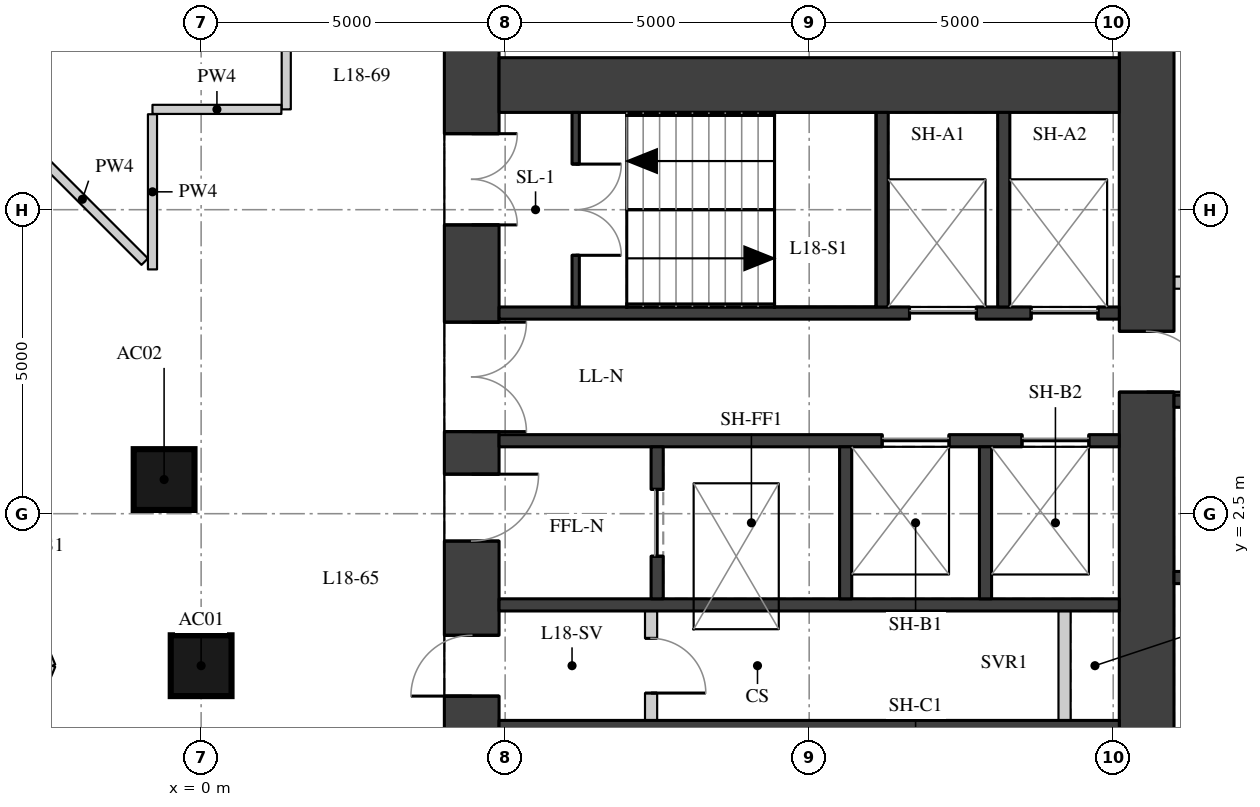
"""IFC4 building model, lengths in metres.
Left out: names, types, materials, properties, quantities, classifications, styles, units other than length and angle.
Written with IfcOpenShell. Run it as: python <this file> out.ifc"""

import sys

from ifc_helpers import new_model, si_unit, direction, frame, frame_2d, origin, origin_2d, place, context, subcontext, project, spatial, rectangle, extrude, element, fill, save


model = new_model("IFC4")
c1 = context("Model", 3, precision=1e-05, world=origin(), true_north=direction((0.0, 1.0)))
c2 = subcontext(c1, "Body", "Model", "MODEL_VIEW")
j1 = project(units=[si_unit("LENGTHUNIT", "METRE"), si_unit("PLANEANGLEUNIT", "RADIAN")], contexts=[c1])
p1 = place(None, origin())
s1 = spatial("IfcSite", under=j1, at=p1, CompositionType="ELEMENT")
p2 = place(p1, origin())
s2 = spatial("IfcBuilding", under=s1, at=p2, CompositionType="ELEMENT")
p3 = place(p2, frame((0.0, 0.0, 67.9)))
s3 = spatial("IfcBuildingStorey", under=s2, at=p3, CompositionType="ELEMENT", Elevation=67.9)
for number, where, z_axis, x_axis in (
    (1, (0.0, 0.0, 0.0), (0.0, 0.0, 1.0), (1.0, 0.0, 0.0)),
    (2, (-0.609, 3.062, 0.0), (0.0, 0.0, 1.0), (1.0, 0.0, 0.0)),
):
    element("IfcColumn", number, at=place(p3, frame(where, z_axis=z_axis, x_axis=x_axis)), inside=s3, PredefinedType="COLUMN", context=c2, shape_type="SweptSolid", body=[
        extrude(rectangle(XDim=1.0, YDim=1.0, at=origin_2d()), origin(), (0.0, 0.0, 1.0), 3.3),
    ])
p4 = place(p3, frame((4.45, -11.1, 0.0), z_axis=(0.0, 0.0, 1.0), x_axis=(0.0, 1.0, 0.0)))
e3 = element("IfcWall", 3, at=p4, inside=s3, PredefinedType="SHEAR", context=c2, shape_type="SweptSolid", body=[
    extrude(rectangle(XDim=22.2, YDim=0.9, at=frame_2d((11.1, 0.0))), origin(), (0.0, 0.0, 1.0), 3.02),
])
p5 = place(p4, frame((2.35, 0.0, 0.0)))
e4 = element("IfcOpeningElement", 4, at=p5, cuts=e3, PredefinedType="OPENING", context=c2, shape_type="SweptSolid", body=[
    extrude(rectangle(XDim=1.5, YDim=2.1, at=frame_2d((0.75, 1.05))), frame((0.0, 0.46, 0.0), z_axis=(0.0, -1.0, 0.0), x_axis=(1.0, 0.0, 0.0)), (0.0, 0.0, 1.0), 0.92),
])
p6 = place(p4, frame((5.45, 0.0, 0.0)))
e5 = element("IfcOpeningElement", 5, at=p6, cuts=e3, PredefinedType="OPENING", context=c2, shape_type="SweptSolid", body=[
    extrude(rectangle(XDim=1.8, YDim=2.1, at=frame_2d((0.9, 1.05))), frame((0.0, 0.46, 0.0), z_axis=(0.0, -1.0, 0.0), x_axis=(1.0, 0.0, 0.0)), (0.0, 0.0, 1.0), 0.92),
])
p7 = place(p4, frame((7.95, 0.0, 0.0)))
e6 = element("IfcOpeningElement", 6, at=p7, cuts=e3, PredefinedType="OPENING", context=c2, shape_type="SweptSolid", body=[
    extrude(rectangle(XDim=1.1, YDim=2.1, at=frame_2d((0.55, 1.05))), frame((0.0, 0.46, 0.0), z_axis=(0.0, -1.0, 0.0), x_axis=(1.0, 0.0, 0.0)), (0.0, 0.0, 1.0), 0.92),
])
p8 = place(p4, frame((10.6, 0.0, 0.0)))
e7 = element("IfcOpeningElement", 7, at=p8, cuts=e3, PredefinedType="OPENING", context=c2, shape_type="SweptSolid", body=[
    extrude(rectangle(XDim=1.0, YDim=2.1, at=frame_2d((0.5, 1.05))), frame((0.0, 0.46, 0.0), z_axis=(0.0, -1.0, 0.0), x_axis=(1.0, 0.0, 0.0)), (0.0, 0.0, 1.0), 0.92),
])
p9 = place(p4, frame((13.15, 0.0, 0.0)))
e8 = element("IfcOpeningElement", 8, at=p9, cuts=e3, PredefinedType="OPENING", context=c2, shape_type="SweptSolid", body=[
    extrude(rectangle(XDim=1.1, YDim=2.1, at=frame_2d((0.55, 1.05))), frame((0.0, 0.46, 0.0), z_axis=(0.0, -1.0, 0.0), x_axis=(1.0, 0.0, 0.0)), (0.0, 0.0, 1.0), 0.92),
])
p10 = place(p4, frame((14.95, 0.0, 0.0)))
e9 = element("IfcOpeningElement", 9, at=p10, cuts=e3, PredefinedType="OPENING", context=c2, shape_type="SweptSolid", body=[
    extrude(rectangle(XDim=1.8, YDim=2.1, at=frame_2d((0.9, 1.05))), frame((0.0, 0.46, 0.0), z_axis=(0.0, -1.0, 0.0), x_axis=(1.0, 0.0, 0.0)), (0.0, 0.0, 1.0), 0.92),
])
p11 = place(p4, frame((18.35, 0.0, 0.0)))
e10 = element("IfcOpeningElement", 10, at=p11, cuts=e3, PredefinedType="OPENING", context=c2, shape_type="SweptSolid", body=[
    extrude(rectangle(XDim=1.5, YDim=2.1, at=frame_2d((0.75, 1.05))), frame((0.0, 0.46, 0.0), z_axis=(0.0, -1.0, 0.0), x_axis=(1.0, 0.0, 0.0)), (0.0, 0.0, 1.0), 0.92),
])
p12 = place(p3, frame((15.55, -11.1, 0.0), z_axis=(0.0, 0.0, 1.0), x_axis=(0.0, 1.0, 0.0)))
e11 = element("IfcWall", 11, at=p12, inside=s3, PredefinedType="SHEAR", context=c2, shape_type="SweptSolid", body=[
    extrude(rectangle(XDim=22.2, YDim=0.9, at=frame_2d((11.1, 0.0))), origin(), (0.0, 0.0, 1.0), 3.02),
])
p13 = place(p12, frame((15.6, 0.0, 0.0)))
e12 = element("IfcOpeningElement", 12, at=p13, cuts=e11, PredefinedType="OPENING", context=c2, shape_type="SweptSolid", body=[
    extrude(rectangle(XDim=1.0, YDim=2.1, at=frame_2d((0.5, 1.05))), frame((0.0, 0.46, 0.0), z_axis=(0.0, -1.0, 0.0), x_axis=(1.0, 0.0, 0.0)), (0.0, 0.0, 1.0), 0.92),
])
p14 = place(p12, frame((5.6, 0.0, 0.0)))
e13 = element("IfcOpeningElement", 13, at=p14, cuts=e11, PredefinedType="OPENING", context=c2, shape_type="SweptSolid", body=[
    extrude(rectangle(XDim=1.0, YDim=2.1, at=frame_2d((0.5, 1.05))), frame((0.0, 0.46, 0.0), z_axis=(0.0, -1.0, 0.0), x_axis=(1.0, 0.0, 0.0)), (0.0, 0.0, 1.0), 0.92),
])
p15 = place(p3, frame((4.9, 9.55, 0.0), z_axis=(0.0, 0.0, 1.0), x_axis=(1.0, 0.0, 0.0)))
e14 = element("IfcWall", 14, at=p15, inside=s3, PredefinedType="SHEAR", context=c2, shape_type="SweptSolid", body=[
    extrude(rectangle(XDim=10.2, YDim=0.9, at=frame_2d((5.1, 0.0))), origin(), (0.0, 0.0, 1.0), 3.02),
])
p16 = place(p3, frame((4.9, 5.8, 0.0), z_axis=(0.0, 0.0, 1.0), x_axis=(1.0, 0.0, 0.0)))
e15 = element("IfcWall", 15, at=p16, inside=s3, PredefinedType="SHEAR", context=c2, shape_type="SweptSolid", body=[
    extrude(rectangle(XDim=10.2, YDim=0.2, at=frame_2d((5.1, 0.0))), origin(), (0.0, 0.0, 1.0), 3.02),
])
p17 = place(p16, frame((6.75, 0.0, 0.0)))
e16 = element("IfcOpeningElement", 16, at=p17, cuts=e15, PredefinedType="OPENING", context=c2, shape_type="SweptSolid", body=[
    extrude(rectangle(XDim=1.1, YDim=2.1, at=frame_2d((0.55, 1.05))), frame((0.0, 0.11, 0.0), z_axis=(0.0, -1.0, 0.0), x_axis=(1.0, 0.0, 0.0)), (0.0, 0.0, 1.0), 0.22),
])
p18 = place(p16, frame((8.75, 0.0, 0.0)))
e17 = element("IfcOpeningElement", 17, at=p18, cuts=e15, PredefinedType="OPENING", context=c2, shape_type="SweptSolid", body=[
    extrude(rectangle(XDim=1.1, YDim=2.1, at=frame_2d((0.55, 1.05))), frame((0.0, 0.11, 0.0), z_axis=(0.0, -1.0, 0.0), x_axis=(1.0, 0.0, 0.0)), (0.0, 0.0, 1.0), 0.22),
])
p19 = place(p3, frame((4.9, 3.7, 0.0), z_axis=(0.0, 0.0, 1.0), x_axis=(1.0, 0.0, 0.0)))
e18 = element("IfcWall", 18, at=p19, inside=s3, PredefinedType="SHEAR", context=c2, shape_type="SweptSolid", body=[
    extrude(rectangle(XDim=10.2, YDim=0.2, at=frame_2d((5.1, 0.0))), origin(), (0.0, 0.0, 1.0), 3.02),
])
p20 = place(p19, frame((6.3, 0.0, 0.0)))
e19 = element("IfcOpeningElement", 19, at=p20, cuts=e18, PredefinedType="OPENING", context=c2, shape_type="SweptSolid", body=[
    extrude(rectangle(XDim=1.1, YDim=2.1, at=frame_2d((0.55, 1.05))), frame((0.0, 0.11, 0.0), z_axis=(0.0, -1.0, 0.0), x_axis=(1.0, 0.0, 0.0)), (0.0, 0.0, 1.0), 0.22),
])
p21 = place(p19, frame((8.6, 0.0, 0.0)))
e20 = element("IfcOpeningElement", 20, at=p21, cuts=e18, PredefinedType="OPENING", context=c2, shape_type="SweptSolid", body=[
    extrude(rectangle(XDim=1.1, YDim=2.1, at=frame_2d((0.55, 1.05))), frame((0.0, 0.11, 0.0), z_axis=(0.0, -1.0, 0.0), x_axis=(1.0, 0.0, 0.0)), (0.0, 0.0, 1.0), 0.22),
])
for number, where, z_axis, x_axis in (
    (21, (4.9, 1.0, 0.0), (0.0, 0.0, 1.0), (1.0, 0.0, 0.0)),
    (22, (4.9, -1.0, 0.0), (0.0, 0.0, 1.0), (1.0, 0.0, 0.0)),
):
    element("IfcWall", number, at=place(p3, frame(where, z_axis=z_axis, x_axis=x_axis)), inside=s3, PredefinedType="SHEAR", context=c2, shape_type="SweptSolid", body=[
        extrude(rectangle(XDim=10.2, YDim=0.2, at=frame_2d((5.1, 0.0))), origin(), (0.0, 0.0, 1.0), 3.02),
    ])
for number, where, z_axis, x_axis in (
    (23, (11.2, 5.9, 0.0), (0.0, 0.0, 1.0), (0.0, 1.0, 0.0)),
    (24, (13.2, 5.9, 0.0), (0.0, 0.0, 1.0), (0.0, 1.0, 0.0)),
):
    element("IfcWall", number, at=place(p3, frame(where, z_axis=z_axis, x_axis=x_axis)), inside=s3, PredefinedType="SHEAR", context=c2, shape_type="SweptSolid", body=[
        extrude(rectangle(XDim=3.2, YDim=0.2, at=frame_2d((1.6, 0.0))), origin(), (0.0, 0.0, 1.0), 3.02),
    ])
p22 = place(p3, frame((7.5, 1.1, 0.0), z_axis=(0.0, 0.0, 1.0), x_axis=(0.0, 1.0, 0.0)))
e25 = element("IfcWall", 25, at=p22, inside=s3, PredefinedType="SHEAR", context=c2, shape_type="SweptSolid", body=[
    extrude(rectangle(XDim=2.5, YDim=0.2, at=frame_2d((1.25, 0.0))), origin(), (0.0, 0.0, 1.0), 3.02),
])
p23 = place(p22, frame((0.7, 0.0, 0.0)))
e26 = element("IfcOpeningElement", 26, at=p23, cuts=e25, PredefinedType="OPENING", context=c2, shape_type="SweptSolid", body=[
    extrude(rectangle(XDim=1.1, YDim=2.1, at=frame_2d((0.55, 1.05))), frame((0.0, 0.11, 0.0), z_axis=(0.0, -1.0, 0.0), x_axis=(1.0, 0.0, 0.0)), (0.0, 0.0, 1.0), 0.22),
])
for number, where, z_axis, x_axis in (
    (27, (10.6, 1.1, 0.0), (0.0, 0.0, 1.0), (0.0, 1.0, 0.0)),
    (28, (12.9, 1.1, 0.0), (0.0, 0.0, 1.0), (0.0, 1.0, 0.0)),
):
    element("IfcWall", number, at=place(p3, frame(where, z_axis=z_axis, x_axis=x_axis)), inside=s3, PredefinedType="SHEAR", context=c2, shape_type="SweptSolid", body=[
        extrude(rectangle(XDim=2.5, YDim=0.2, at=frame_2d((1.25, 0.0))), origin(), (0.0, 0.0, 1.0), 3.02),
    ])
p24 = place(p3, frame((6.16, 5.9, 0.0), z_axis=(0.0, 0.0, 1.0), x_axis=(0.0, 1.0, 0.0)))
e29 = element("IfcWall", 29, at=p24, inside=s3, PredefinedType="SHEAR", context=c2, shape_type="SweptSolid", body=[
    extrude(rectangle(XDim=3.2, YDim=0.12, at=frame_2d((1.6, 0.0))), origin(), (0.0, 0.0, 1.0), 3.02),
])
p25 = place(p24, frame((0.85, 0.0, 0.0)))
e30 = element("IfcOpeningElement", 30, at=p25, cuts=e29, PredefinedType="OPENING", context=c2, shape_type="SweptSolid", body=[
    extrude(rectangle(XDim=1.5, YDim=2.1, at=frame_2d((0.75, 1.05))), frame((0.0, 0.07, 0.0), z_axis=(0.0, -1.0, 0.0), x_axis=(1.0, 0.0, 0.0)), (0.0, 0.0, 1.0), 0.14),
])
p26 = place(p3, frame((7.4, -0.9, 0.0), z_axis=(0.0, 0.0, 1.0), x_axis=(0.0, 1.0, 0.0)))
e31 = element("IfcWall", 31, at=p26, inside=s3, PredefinedType="PARTITIONING", context=c2, shape_type="SweptSolid", body=[
    extrude(rectangle(XDim=1.8, YDim=0.2, at=frame_2d((0.9, 0.0))), origin(), (0.0, 0.0, 1.0), 3.02),
])
p27 = place(p26, frame((0.45, 0.0, 0.0)))
e32 = element("IfcOpeningElement", 32, at=p27, cuts=e31, PredefinedType="OPENING", context=c2, shape_type="SweptSolid", body=[
    extrude(rectangle(XDim=0.9, YDim=2.1, at=frame_2d((0.45, 1.05))), frame((0.0, 0.11, 0.0), z_axis=(0.0, -1.0, 0.0), x_axis=(1.0, 0.0, 0.0)), (0.0, 0.0, 1.0), 0.22),
])
p28 = place(p3, frame((14.2, -0.9, 0.0), z_axis=(0.0, 0.0, 1.0), x_axis=(0.0, 1.0, 0.0)))
e33 = element("IfcWall", 33, at=p28, inside=s3, PredefinedType="PARTITIONING", context=c2, shape_type="SweptSolid", body=[
    extrude(rectangle(XDim=1.8, YDim=0.2, at=frame_2d((0.9, 0.0))), origin(), (0.0, 0.0, 1.0), 3.02),
])
for number, where, z_axis, x_axis in (
    (34, (16.0, 1.45, 0.0), (0.0, 0.0, 1.0), (1.0, 0.0, 0.0)),
    (35, (16.0, 4.35, 0.0), (0.0, 0.0, 1.0), (1.0, 0.0, 0.0)),
):
    element("IfcWall", number, at=place(p3, frame(where, z_axis=z_axis, x_axis=x_axis)), inside=s3, PredefinedType="SHEAR", context=c2, shape_type="SweptSolid", body=[
        extrude(rectangle(XDim=2.3, YDim=0.2, at=frame_2d((1.15, 0.0))), origin(), (0.0, 0.0, 1.0), 3.02),
    ])
p29 = place(p3, frame((16.0, 6.3, 0.0), z_axis=(0.0, 0.0, 1.0), x_axis=(1.0, 0.0, 0.0)))
e36 = element("IfcWall", 36, at=p29, inside=s3, PredefinedType="PARTITIONING", context=c2, shape_type="SweptSolid", body=[
    extrude(rectangle(XDim=2.3, YDim=0.2, at=frame_2d((1.15, 0.0))), origin(), (0.0, 0.0, 1.0), 3.02),
])
p30 = place(p29, frame((0.3, 0.0, 0.0)))
e37 = element("IfcOpeningElement", 37, at=p30, cuts=e36, PredefinedType="OPENING", context=c2, shape_type="SweptSolid", body=[
    extrude(rectangle(XDim=0.9, YDim=2.1, at=frame_2d((0.45, 1.05))), frame((0.0, 0.11, 0.0), z_axis=(0.0, -1.0, 0.0), x_axis=(1.0, 0.0, 0.0)), (0.0, 0.0, 1.0), 0.22),
])
p31 = place(p3, frame((1.4, 14.12, 0.0), z_axis=(0.0, 0.0, 1.0), x_axis=(0.0, -1.0, 0.0)))
e38 = element("IfcWall", 38, at=p31, inside=s3, PredefinedType="PARTITIONING", context=c2, shape_type="SweptSolid", body=[
    extrude(rectangle(XDim=4.97, YDim=0.15, at=frame_2d((2.485, 0.0))), origin(), (0.0, 0.0, 1.0), 3.02),
])
p32 = place(p3, frame((1.32, 9.15, 0.0), z_axis=(0.0, 0.0, 1.0), x_axis=(-1.0, 0.0, 0.0)))
e39 = element("IfcWall", 39, at=p32, inside=s3, PredefinedType="PARTITIONING", context=c2, shape_type="SweptSolid", body=[
    extrude(rectangle(XDim=2.12, YDim=0.15, at=frame_2d((1.06, 0.0))), origin(), (0.0, 0.0, 1.0), 3.02),
])
p33 = place(p3, frame((-0.8, 9.07, 0.0), z_axis=(0.0, 0.0, 1.0), x_axis=(0.0, -1.0, 0.0)))
e40 = element("IfcWall", 40, at=p33, inside=s3, PredefinedType="PARTITIONING", context=c2, shape_type="SweptSolid", body=[
    extrude(rectangle(XDim=2.552, YDim=0.15, at=frame_2d((1.276, 0.0))), origin(), (0.0, 0.0, 1.0), 3.02),
])
p34 = place(p3, frame((-0.927, 6.645, 0.0), z_axis=(0.0, 0.0, 1.0), x_axis=(-0.707106781187, 0.707106781187, 0.0)))
e41 = element("IfcWall", 41, at=p34, inside=s3, PredefinedType="PARTITIONING", context=c2, shape_type="SweptSolid", body=[
    extrude(rectangle(XDim=2.901, YDim=0.15, at=frame_2d((1.451, 0.0))), origin(), (0.0, 0.0, 1.0), 3.02),
])
for number, where, z_axis, x_axis in (
    (42, (-2.446, 0.0, 0.0), (0.0, 0.0, 1.0), (-0.383, -0.924, 0.0)),
    (43, (-4.073, 3.927, 0.0), (0.0, 0.0, 1.0), (0.383, -0.924, 0.0)),
):
    element("IfcWall", number, at=place(p3, frame(where, z_axis=z_axis, x_axis=x_axis)), inside=s3, PredefinedType="PARTITIONING", context=c2, shape_type="SweptSolid", body=[
        extrude(rectangle(XDim=4.251, YDim=0.1, at=frame_2d((2.125, 0.0))), origin(), (0.0, 0.0, 1.0), 3.02),
    ])
p35 = place(p8, origin())
e44 = element("IfcDoor", 44, at=p35, inside=s3, OperationType="SINGLE_SWING_LEFT", PredefinedType="DOOR", context=c2, shape_type="SweptSolid", body=[
    extrude(rectangle(XDim=1.0, YDim=2.1, at=frame_2d((0.5, 1.05))), frame((0.0, 0.025, 0.0), z_axis=(0.0, -1.0, 0.0), x_axis=(1.0, 0.0, 0.0)), (0.0, 0.0, 1.0), 0.05),
])
fill(e7, e44)
p36 = place(p9, origin())
e45 = element("IfcDoor", 45, at=p36, inside=s3, OperationType="SINGLE_SWING_LEFT", PredefinedType="DOOR", context=c2, shape_type="SweptSolid", body=[
    extrude(rectangle(XDim=1.1, YDim=2.1, at=frame_2d((0.55, 1.05))), frame((0.0, 0.025, 0.0), z_axis=(0.0, -1.0, 0.0), x_axis=(1.0, 0.0, 0.0)), (0.0, 0.0, 1.0), 0.05),
])
fill(e8, e45)
p37 = place(p10, origin())
e46 = element("IfcDoor", 46, at=p37, inside=s3, OperationType="DOUBLE_DOOR_SINGLE_SWING", PredefinedType="DOOR", context=c2, shape_type="SweptSolid", body=[
    extrude(rectangle(XDim=1.8, YDim=2.1, at=frame_2d((0.9, 1.05))), frame((0.0, 0.025, 0.0), z_axis=(0.0, -1.0, 0.0), x_axis=(1.0, 0.0, 0.0)), (0.0, 0.0, 1.0), 0.05),
])
fill(e9, e46)
p38 = place(p11, origin())
e47 = element("IfcDoor", 47, at=p38, inside=s3, OperationType="DOUBLE_DOOR_SINGLE_SWING", PredefinedType="DOOR", context=c2, shape_type="SweptSolid", body=[
    extrude(rectangle(XDim=1.5, YDim=2.1, at=frame_2d((0.75, 1.05))), frame((0.0, 0.025, 0.0), z_axis=(0.0, -1.0, 0.0), x_axis=(1.0, 0.0, 0.0)), (0.0, 0.0, 1.0), 0.05),
])
fill(e10, e47)
p39 = place(p25, origin())
e48 = element("IfcDoor", 48, at=p39, inside=s3, OperationType="DOUBLE_DOOR_SINGLE_SWING", PredefinedType="DOOR", context=c2, shape_type="SweptSolid", body=[
    extrude(rectangle(XDim=1.5, YDim=2.1, at=frame_2d((0.75, 1.05))), frame((0.0, 0.025, 0.0), z_axis=(0.0, -1.0, 0.0), x_axis=(1.0, 0.0, 0.0)), (0.0, 0.0, 1.0), 0.05),
])
fill(e30, e48)
p40 = place(p17, origin())
e49 = element("IfcDoor", 49, at=p40, inside=s3, OperationType="DOUBLE_DOOR_SLIDING", PredefinedType="DOOR", context=c2, shape_type="SweptSolid", body=[
    extrude(rectangle(XDim=1.1, YDim=2.1, at=frame_2d((0.55, 1.05))), frame((0.0, 0.025, 0.0), z_axis=(0.0, -1.0, 0.0), x_axis=(1.0, 0.0, 0.0)), (0.0, 0.0, 1.0), 0.05),
])
fill(e16, e49)
p41 = place(p18, origin())
e50 = element("IfcDoor", 50, at=p41, inside=s3, OperationType="DOUBLE_DOOR_SLIDING", PredefinedType="DOOR", context=c2, shape_type="SweptSolid", body=[
    extrude(rectangle(XDim=1.1, YDim=2.1, at=frame_2d((0.55, 1.05))), frame((0.0, 0.025, 0.0), z_axis=(0.0, -1.0, 0.0), x_axis=(1.0, 0.0, 0.0)), (0.0, 0.0, 1.0), 0.05),
])
fill(e17, e50)
p42 = place(p20, origin())
e51 = element("IfcDoor", 51, at=p42, inside=s3, OperationType="DOUBLE_DOOR_SLIDING", PredefinedType="DOOR", context=c2, shape_type="SweptSolid", body=[
    extrude(rectangle(XDim=1.1, YDim=2.1, at=frame_2d((0.55, 1.05))), frame((0.0, 0.025, 0.0), z_axis=(0.0, -1.0, 0.0), x_axis=(1.0, 0.0, 0.0)), (0.0, 0.0, 1.0), 0.05),
])
fill(e19, e51)
p43 = place(p21, origin())
e52 = element("IfcDoor", 52, at=p43, inside=s3, OperationType="DOUBLE_DOOR_SLIDING", PredefinedType="DOOR", context=c2, shape_type="SweptSolid", body=[
    extrude(rectangle(XDim=1.1, YDim=2.1, at=frame_2d((0.55, 1.05))), frame((0.0, 0.025, 0.0), z_axis=(0.0, -1.0, 0.0), x_axis=(1.0, 0.0, 0.0)), (0.0, 0.0, 1.0), 0.05),
])
fill(e20, e52)
p44 = place(p23, origin())
e53 = element("IfcDoor", 53, at=p44, inside=s3, OperationType="DOUBLE_DOOR_SLIDING", PredefinedType="DOOR", context=c2, shape_type="SweptSolid", body=[
    extrude(rectangle(XDim=1.1, YDim=2.1, at=frame_2d((0.55, 1.05))), frame((0.0, 0.025, 0.0), z_axis=(0.0, -1.0, 0.0), x_axis=(1.0, 0.0, 0.0)), (0.0, 0.0, 1.0), 0.05),
])
fill(e26, e53)
p45 = place(p27, origin())
e54 = element("IfcDoor", 54, at=p45, inside=s3, OperationType="SINGLE_SWING_RIGHT", PredefinedType="DOOR", context=c2, shape_type="SweptSolid", body=[
    extrude(rectangle(XDim=0.9, YDim=2.1, at=frame_2d((0.45, 1.05))), frame((0.0, 0.025, 0.0), z_axis=(0.0, -1.0, 0.0), x_axis=(1.0, 0.0, 0.0)), (0.0, 0.0, 1.0), 0.05),
])
fill(e32, e54)
p46 = place(p13, origin())
e55 = element("IfcDoor", 55, at=p46, inside=s3, OperationType="SINGLE_SWING_RIGHT", PredefinedType="DOOR", context=c2, shape_type="SweptSolid", body=[
    extrude(rectangle(XDim=1.0, YDim=2.1, at=frame_2d((0.5, 1.05))), frame((0.0, 0.025, 0.0), z_axis=(0.0, -1.0, 0.0), x_axis=(1.0, 0.0, 0.0)), (0.0, 0.0, 1.0), 0.05),
])
fill(e12, e55)
save(model, sys.argv[1])
